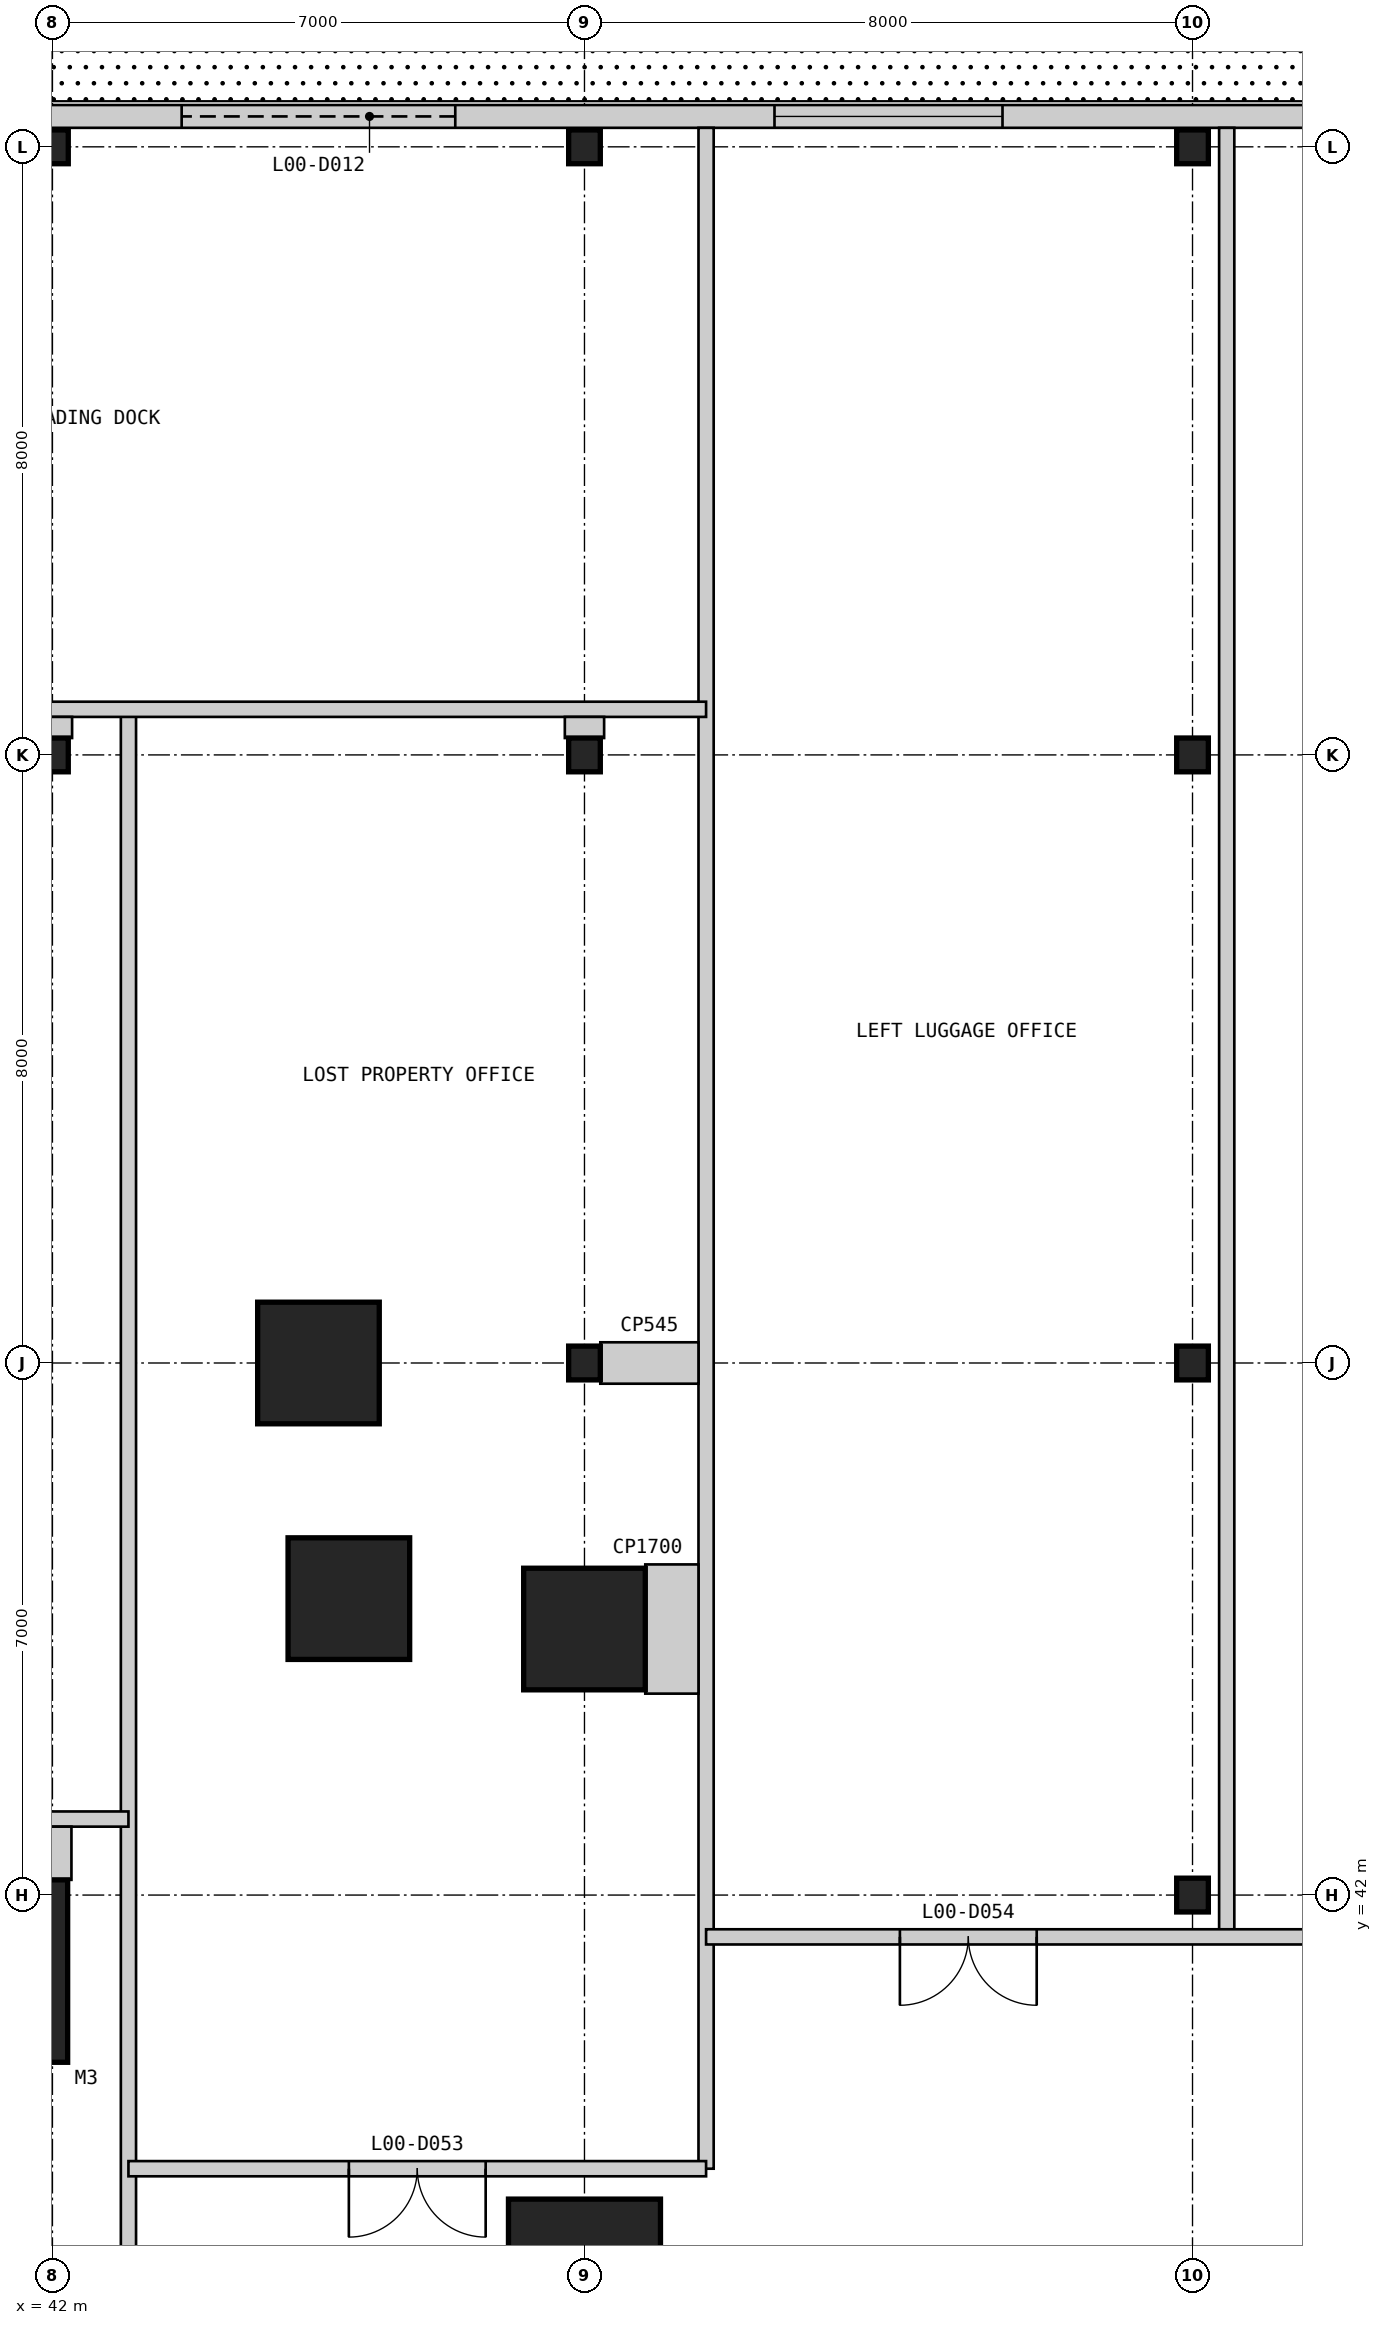
"""IFC4 building model, lengths in metres.
Left out: names, types, materials, properties, quantities, classifications, styles, units other than length and angle.
Written with IfcOpenShell. Run it as: python <this file> out.ifc"""

import sys

from ifc_helpers import new_model, si_unit, direction, frame, frame_2d, origin, origin_2d, place, context, subcontext, project, spatial, rectangle, i_section, extrude, element, fill, save


model = new_model("IFC4")
c1 = context("Model", 3, precision=1e-05, world=origin(), true_north=direction((0.0, 1.0)))
c2 = subcontext(c1, "Body", "Model", "MODEL_VIEW")
j1 = project(units=[si_unit("LENGTHUNIT", "METRE"), si_unit("PLANEANGLEUNIT", "RADIAN")], contexts=[c1])
p1 = place(None, origin())
s1 = spatial("IfcSite", under=j1, at=p1, CompositionType="ELEMENT")
p2 = place(p1, origin())
s2 = spatial("IfcBuilding", under=s1, at=p2, CompositionType="ELEMENT")
p3 = place(p2, origin())
s3 = spatial("IfcBuildingStorey", under=s2, at=p3, CompositionType="ELEMENT", Elevation=0.0)
p4 = place(p3, frame((41.0, 41.0, 0.0), z_axis=(0.0, 0.0, 1.0), x_axis=(1.0, 0.0, 0.0)))
e1 = element("IfcColumn", 1, at=p4, inside=s3, PredefinedType="COLUMN", context=c2, shape_type="SweptSolid", body=[
    extrude(rectangle(XDim=2.4, YDim=2.4, at=origin_2d()), origin(), (0.0, 0.0, 1.0), 7.0),
])
p5 = place(p3, frame((49.0, 37.0, 0.0), z_axis=(0.0, 0.0, 1.0), x_axis=(1.0, 0.0, 0.0)))
e2 = element("IfcColumn", 2, at=p5, inside=s3, PredefinedType="COLUMN", context=c2, shape_type="SweptSolid", body=[
    extrude(rectangle(XDim=2.0, YDim=2.0, at=origin_2d()), origin(), (0.0, 0.0, 1.0), 7.0),
])
for number, where, z_axis, x_axis in (
    (3, (49.0, 45.5, 0.0), (0.0, 0.0, 1.0), (1.0, 0.0, 0.0)),
    (4, (45.9, 45.9, 0.0), (0.0, 0.0, 1.0), (1.0, 0.0, 0.0)),
    (5, (45.5, 49.0, 0.0), (0.0, 0.0, 1.0), (1.0, 0.0, 0.0)),
):
    element("IfcColumn", number, at=place(p3, frame(where, z_axis=z_axis, x_axis=x_axis)), inside=s3, PredefinedType="COLUMN", context=c2, shape_type="SweptSolid", body=[
        extrude(rectangle(XDim=1.6, YDim=1.6, at=origin_2d()), origin(), (0.0, 0.0, 1.0), 7.0),
    ])
p6 = place(p3, frame((42.0, 57.0, 0.0), z_axis=(0.0, 0.0, 1.0), x_axis=(1.0, 0.0, 0.0)))
e6 = element("IfcColumn", 6, at=p6, inside=s3, PredefinedType="COLUMN", context=c2, shape_type="SweptSolid", body=[
    extrude(i_section(OverallWidth=0.417, OverallDepth=0.445, WebThickness=0.039, FlangeThickness=0.063, at=origin_2d()), origin(), (0.0, 0.0, 1.0), 7.0),
])
p7 = place(p3, frame((42.0, 65.0, -0.3), z_axis=(0.0, 0.0, 1.0), x_axis=(1.0, 0.0, 0.0)))
e7 = element("IfcColumn", 7, at=p7, inside=s3, PredefinedType="COLUMN", context=c2, shape_type="SweptSolid", body=[
    extrude(i_section(OverallWidth=0.417, OverallDepth=0.445, WebThickness=0.039, FlangeThickness=0.063, at=origin_2d()), origin(), (0.0, 0.0, 1.0), 7.3),
])
for number, where, z_axis, x_axis in (
    (8, (49.0, 49.0, 0.0), (0.0, 0.0, 1.0), (1.0, 0.0, 0.0)),
    (9, (49.0, 57.0, 0.0), (0.0, 0.0, 1.0), (1.0, 0.0, 0.0)),
):
    element("IfcColumn", number, at=place(p3, frame(where, z_axis=z_axis, x_axis=x_axis)), inside=s3, PredefinedType="COLUMN", context=c2, shape_type="SweptSolid", body=[
        extrude(i_section(OverallWidth=0.417, OverallDepth=0.445, WebThickness=0.039, FlangeThickness=0.063, at=origin_2d()), origin(), (0.0, 0.0, 1.0), 7.0),
    ])
p8 = place(p3, frame((49.0, 65.0, -0.3), z_axis=(0.0, 0.0, 1.0), x_axis=(1.0, 0.0, 0.0)))
e10 = element("IfcColumn", 10, at=p8, inside=s3, PredefinedType="COLUMN", context=c2, shape_type="SweptSolid", body=[
    extrude(i_section(OverallWidth=0.417, OverallDepth=0.445, WebThickness=0.039, FlangeThickness=0.063, at=origin_2d()), origin(), (0.0, 0.0, 1.0), 7.3),
])
for number, where, z_axis, x_axis in (
    (11, (57.0, 42.0, 0.0), (0.0, 0.0, 1.0), (1.0, 0.0, 0.0)),
    (12, (57.0, 49.0, 0.0), (0.0, 0.0, 1.0), (1.0, 0.0, 0.0)),
    (13, (57.0, 57.0, 0.0), (0.0, 0.0, 1.0), (1.0, 0.0, 0.0)),
):
    element("IfcColumn", number, at=place(p3, frame(where, z_axis=z_axis, x_axis=x_axis)), inside=s3, PredefinedType="COLUMN", context=c2, shape_type="SweptSolid", body=[
        extrude(i_section(OverallWidth=0.417, OverallDepth=0.445, WebThickness=0.039, FlangeThickness=0.063, at=origin_2d()), origin(), (0.0, 0.0, 1.0), 7.0),
    ])
p9 = place(p3, frame((57.0, 65.0, -0.3), z_axis=(0.0, 0.0, 1.0), x_axis=(1.0, 0.0, 0.0)))
e14 = element("IfcColumn", 14, at=p9, inside=s3, PredefinedType="COLUMN", context=c2, shape_type="SweptSolid", body=[
    extrude(i_section(OverallWidth=0.417, OverallDepth=0.445, WebThickness=0.039, FlangeThickness=0.063, at=origin_2d()), origin(), (0.0, 0.0, 1.0), 7.3),
])
p10 = place(p3, frame((65.55, 65.4, 0.0), z_axis=(0.0, 0.0, 1.0), x_axis=(-1.0, 0.0, 0.0)))
e15 = element("IfcWall", 15, at=p10, inside=s3, PredefinedType="SOLIDWALL", context=c2, shape_type="SweptSolid", body=[
    extrude(rectangle(XDim=81.1, YDim=0.3, at=frame_2d((40.55, 0.0))), origin(), (0.0, 0.0, 1.0), 6.7),
])
p11 = place(p10, frame((37.65, 0.0, 0.0)))
e16 = element("IfcOpeningElement", 16, at=p11, cuts=e15, PredefinedType="OPENING", context=c2, shape_type="SweptSolid", body=[
    extrude(rectangle(XDim=1.8, YDim=2.4, at=frame_2d((0.9, 1.2))), frame((0.0, 0.16, 0.0), z_axis=(0.0, -1.0, 0.0), x_axis=(1.0, 0.0, 0.0)), (0.0, 0.0, 1.0), 0.32),
])
p12 = place(p10, frame((33.65, 0.0, 0.0)))
e17 = element("IfcOpeningElement", 17, at=p12, cuts=e15, PredefinedType="OPENING", context=c2, shape_type="SweptSolid", body=[
    extrude(rectangle(XDim=1.8, YDim=2.4, at=frame_2d((0.9, 1.2))), frame((0.0, 0.16, 0.0), z_axis=(0.0, -1.0, 0.0), x_axis=(1.0, 0.0, 0.0)), (0.0, 0.0, 1.0), 0.32),
])
p13 = place(p10, frame((18.25, 0.0, 0.0)))
e18 = element("IfcOpeningElement", 18, at=p13, cuts=e15, PredefinedType="OPENING", context=c2, shape_type="SweptSolid", body=[
    extrude(rectangle(XDim=3.6, YDim=4.5, at=frame_2d((1.8, 2.25))), frame((0.0, 0.16, 0.0), z_axis=(0.0, -1.0, 0.0), x_axis=(1.0, 0.0, 0.0)), (0.0, 0.0, 1.0), 0.32),
])
p14 = place(p10, frame((75.05, 0.0, 0.9)))
e19 = element("IfcOpeningElement", 19, at=p14, cuts=e15, PredefinedType="OPENING", context=c2, shape_type="SweptSolid", body=[
    extrude(rectangle(XDim=3.0, YDim=2.4, at=frame_2d((1.5, 1.2))), frame((0.0, 0.16, 0.0), z_axis=(0.0, -1.0, 0.0), x_axis=(1.0, 0.0, 0.0)), (0.0, 0.0, 1.0), 0.32),
])
p15 = place(p10, frame((67.05, 0.0, 0.9)))
e20 = element("IfcOpeningElement", 20, at=p15, cuts=e15, PredefinedType="OPENING", context=c2, shape_type="SweptSolid", body=[
    extrude(rectangle(XDim=3.0, YDim=2.4, at=frame_2d((1.5, 1.2))), frame((0.0, 0.16, 0.0), z_axis=(0.0, -1.0, 0.0), x_axis=(1.0, 0.0, 0.0)), (0.0, 0.0, 1.0), 0.32),
])
p16 = place(p10, frame((59.05, 0.0, 0.9)))
e21 = element("IfcOpeningElement", 21, at=p16, cuts=e15, PredefinedType="OPENING", context=c2, shape_type="SweptSolid", body=[
    extrude(rectangle(XDim=3.0, YDim=2.4, at=frame_2d((1.5, 1.2))), frame((0.0, 0.16, 0.0), z_axis=(0.0, -1.0, 0.0), x_axis=(1.0, 0.0, 0.0)), (0.0, 0.0, 1.0), 0.32),
])
p17 = place(p10, frame((45.05, 0.0, 0.9)))
e22 = element("IfcOpeningElement", 22, at=p17, cuts=e15, PredefinedType="OPENING", context=c2, shape_type="SweptSolid", body=[
    extrude(rectangle(XDim=3.0, YDim=2.4, at=frame_2d((1.5, 1.2))), frame((0.0, 0.16, 0.0), z_axis=(0.0, -1.0, 0.0), x_axis=(1.0, 0.0, 0.0)), (0.0, 0.0, 1.0), 0.32),
])
p18 = place(p10, frame((24.55, 0.0, 0.9)))
e23 = element("IfcOpeningElement", 23, at=p18, cuts=e15, PredefinedType="OPENING", context=c2, shape_type="SweptSolid", body=[
    extrude(rectangle(XDim=3.0, YDim=2.4, at=frame_2d((1.5, 1.2))), frame((0.0, 0.16, 0.0), z_axis=(0.0, -1.0, 0.0), x_axis=(1.0, 0.0, 0.0)), (0.0, 0.0, 1.0), 0.32),
])
p19 = place(p10, frame((11.05, 0.0, 0.9)))
e24 = element("IfcOpeningElement", 24, at=p19, cuts=e15, PredefinedType="OPENING", context=c2, shape_type="SweptSolid", body=[
    extrude(rectangle(XDim=3.0, YDim=2.4, at=frame_2d((1.5, 1.2))), frame((0.0, 0.16, 0.0), z_axis=(0.0, -1.0, 0.0), x_axis=(1.0, 0.0, 0.0)), (0.0, 0.0, 1.0), 0.32),
])
p20 = place(p10, frame((3.05, 0.0, 0.9)))
e25 = element("IfcOpeningElement", 25, at=p20, cuts=e15, PredefinedType="OPENING", context=c2, shape_type="SweptSolid", body=[
    extrude(rectangle(XDim=3.0, YDim=2.4, at=frame_2d((1.5, 1.2))), frame((0.0, 0.16, 0.0), z_axis=(0.0, -1.0, 0.0), x_axis=(1.0, 0.0, 0.0)), (0.0, 0.0, 1.0), 0.32),
])
p21 = place(p3, frame((43.0, 37.0, 0.0), z_axis=(0.0, 0.0, 1.0), x_axis=(0.0, 1.0, 0.0)))
e26 = element("IfcWall", 26, at=p21, inside=s3, PredefinedType="PARTITIONING", context=c2, shape_type="SweptSolid", body=[
    extrude(rectangle(XDim=20.6, YDim=0.2, at=frame_2d((10.3, 0.0))), origin(), (0.0, 0.0, 1.0), 6.7),
])
p22 = place(p3, frame((50.6, 38.4, 0.0), z_axis=(0.0, 0.0, 1.0), x_axis=(0.0, 1.0, 0.0)))
e27 = element("IfcWall", 27, at=p22, inside=s3, PredefinedType="PARTITIONING", context=c2, shape_type="SweptSolid", body=[
    extrude(rectangle(XDim=26.85, YDim=0.2, at=frame_2d((13.425, 0.0))), origin(), (0.0, 0.0, 1.0), 6.7),
])
p23 = place(p3, frame((57.45, 41.45, 0.0), z_axis=(0.0, 0.0, 1.0), x_axis=(0.0, 1.0, 0.0)))
e28 = element("IfcWall", 28, at=p23, inside=s3, PredefinedType="PARTITIONING", context=c2, shape_type="SweptSolid", body=[
    extrude(rectangle(XDim=23.8, YDim=0.2, at=frame_2d((11.9, 0.0))), origin(), (0.0, 0.0, 1.0), 6.7),
])
p24 = place(p3, frame((43.0, 38.4, 0.0), z_axis=(0.0, 0.0, 1.0), x_axis=(1.0, 0.0, 0.0)))
e29 = element("IfcWall", 29, at=p24, inside=s3, PredefinedType="PARTITIONING", context=c2, shape_type="SweptSolid", body=[
    extrude(rectangle(XDim=7.6, YDim=0.2, at=frame_2d((3.8, 0.0))), origin(), (0.0, 0.0, 1.0), 6.7),
])
p25 = place(p24, frame((2.9, 0.0, 0.0)))
e30 = element("IfcOpeningElement", 30, at=p25, cuts=e29, PredefinedType="OPENING", context=c2, shape_type="SweptSolid", body=[
    extrude(rectangle(XDim=1.8, YDim=2.4, at=frame_2d((0.9, 1.2))), frame((0.0, 0.11, 0.0), z_axis=(0.0, -1.0, 0.0), x_axis=(1.0, 0.0, 0.0)), (0.0, 0.0, 1.0), 0.22),
])
p26 = place(p3, frame((50.6, 41.45, 0.0), z_axis=(0.0, 0.0, 1.0), x_axis=(1.0, 0.0, 0.0)))
e31 = element("IfcWall", 31, at=p26, inside=s3, PredefinedType="PARTITIONING", context=c2, shape_type="SweptSolid", body=[
    extrude(rectangle(XDim=14.65, YDim=0.2, at=frame_2d((7.325, 0.0))), origin(), (0.0, 0.0, 1.0), 6.7),
])
p27 = place(p26, frame((2.55, 0.0, 0.0)))
e32 = element("IfcOpeningElement", 32, at=p27, cuts=e31, PredefinedType="OPENING", context=c2, shape_type="SweptSolid", body=[
    extrude(rectangle(XDim=1.8, YDim=2.4, at=frame_2d((0.9, 1.2))), frame((0.0, 0.11, 0.0), z_axis=(0.0, -1.0, 0.0), x_axis=(1.0, 0.0, 0.0)), (0.0, 0.0, 1.0), 0.22),
])
p28 = place(p26, frame((9.825, 0.0, 0.0)))
e33 = element("IfcOpeningElement", 33, at=p28, cuts=e31, PredefinedType="OPENING", context=c2, shape_type="SweptSolid", body=[
    extrude(rectangle(XDim=1.8, YDim=2.4, at=frame_2d((0.9, 1.2))), frame((0.0, 0.11, 0.0), z_axis=(0.0, -1.0, 0.0), x_axis=(1.0, 0.0, 0.0)), (0.0, 0.0, 1.0), 0.22),
])
p29 = place(p3, frame((33.6, 43.0, 0.0), z_axis=(0.0, 0.0, 1.0), x_axis=(1.0, 0.0, 0.0)))
e34 = element("IfcWall", 34, at=p29, inside=s3, PredefinedType="PARTITIONING", context=c2, shape_type="SweptSolid", body=[
    extrude(rectangle(XDim=9.4, YDim=0.2, at=frame_2d((4.7, 0.0))), origin(), (0.0, 0.0, 1.0), 6.7),
])
p30 = place(p3, frame((34.4, 57.6, 0.0), z_axis=(0.0, 0.0, 1.0), x_axis=(1.0, 0.0, 0.0)))
e35 = element("IfcWall", 35, at=p30, inside=s3, PredefinedType="PARTITIONING", context=c2, shape_type="SweptSolid", body=[
    extrude(rectangle(XDim=16.2, YDim=0.2, at=frame_2d((8.1, 0.0))), origin(), (0.0, 0.0, 1.0), 6.7),
])
p31 = place(p3, frame((50.5, 45.5, 0.0), z_axis=(0.0, 0.0, 1.0), x_axis=(-1.0, 0.0, 0.0)))
e36 = element("IfcWall", 36, at=p31, inside=s3, PredefinedType="PARTITIONING", context=c2, shape_type="SweptSolid", body=[
    extrude(rectangle(XDim=0.7, YDim=1.7, at=frame_2d((0.35, 0.0))), origin(), (0.0, 0.0, 1.0), 6.7),
])
p32 = place(p3, frame((50.5, 49.0, 0.0), z_axis=(0.0, 0.0, 1.0), x_axis=(-1.0, 0.0, 0.0)))
e37 = element("IfcWall", 37, at=p32, inside=s3, PredefinedType="PARTITIONING", context=c2, shape_type="SweptSolid", body=[
    extrude(rectangle(XDim=1.292, YDim=0.545, at=frame_2d((0.646, 0.0))), origin(), (0.0, 0.0, 1.0), 5.954),
])
for number, where, z_axis, x_axis in (
    (38, (49.0, 57.5, 0.0), (0.0, 0.0, 1.0), (0.0, -1.0, 0.0)),
    (39, (42.0, 57.5, 0.0), (0.0, 0.0, 1.0), (0.0, -1.0, 0.0)),
):
    element("IfcWall", number, at=place(p3, frame(where, z_axis=z_axis, x_axis=x_axis)), inside=s3, PredefinedType="PARTITIONING", context=c2, shape_type="SweptSolid", body=[
        extrude(rectangle(XDim=0.278, YDim=0.517, at=frame_2d((0.139, 0.0))), origin(), (0.0, 0.0, 1.0), 6.7),
    ])
p33 = place(p3, frame((41.0, 42.9, 0.0), z_axis=(0.0, 0.0, 1.0), x_axis=(0.0, -1.0, 0.0)))
e40 = element("IfcWall", 40, at=p33, inside=s3, PredefinedType="PARTITIONING", context=c2, shape_type="SweptSolid", body=[
    extrude(rectangle(XDim=0.7, YDim=2.5, at=frame_2d((0.35, 0.0))), origin(), (0.0, 0.0, 1.0), 6.7),
])
p34 = place(p13, origin())
e41 = element("IfcDoor", 41, at=p34, inside=s3, OperationType="ROLLINGUP", PredefinedType="DOOR", context=c2, shape_type="SweptSolid", body=[
    extrude(rectangle(XDim=3.6, YDim=4.5, at=frame_2d((1.8, 2.25))), frame((0.0, 0.025, 0.0), z_axis=(0.0, -1.0, 0.0), x_axis=(1.0, 0.0, 0.0)), (0.0, 0.0, 1.0), 0.05),
])
fill(e18, e41)
p35 = place(p19, origin())
e42 = element("IfcWindow", 42, at=p35, inside=s3, PartitioningType="SINGLE_PANEL", PredefinedType="WINDOW", context=c2, shape_type="SweptSolid", body=[
    extrude(rectangle(XDim=3.0, YDim=2.4, at=frame_2d((1.5, 1.2))), frame((0.0, 0.03, 0.0), z_axis=(0.0, -1.0, 0.0), x_axis=(1.0, 0.0, 0.0)), (0.0, 0.0, 1.0), 0.06),
])
fill(e24, e42)
p36 = place(p25, frame((1.8, 0.0, 0.0), z_axis=(0.0, 0.0, 1.0), x_axis=(-1.0, 0.0, 0.0)))
e43 = element("IfcDoor", 43, at=p36, inside=s3, OperationType="DOUBLE_DOOR_SINGLE_SWING", PredefinedType="DOOR", context=c2, shape_type="SweptSolid", body=[
    extrude(rectangle(XDim=1.8, YDim=2.4, at=frame_2d((0.9, 1.2))), frame((0.0, 0.025, 0.0), z_axis=(0.0, -1.0, 0.0), x_axis=(1.0, 0.0, 0.0)), (0.0, 0.0, 1.0), 0.05),
])
fill(e30, e43)
p37 = place(p27, frame((1.8, 0.0, 0.0), z_axis=(0.0, 0.0, 1.0), x_axis=(-1.0, 0.0, 0.0)))
e44 = element("IfcDoor", 44, at=p37, inside=s3, OperationType="DOUBLE_DOOR_SINGLE_SWING", PredefinedType="DOOR", context=c2, shape_type="SweptSolid", body=[
    extrude(rectangle(XDim=1.8, YDim=2.4, at=frame_2d((0.9, 1.2))), frame((0.0, 0.025, 0.0), z_axis=(0.0, -1.0, 0.0), x_axis=(1.0, 0.0, 0.0)), (0.0, 0.0, 1.0), 0.05),
])
fill(e32, e44)
save(model, sys.argv[1])
